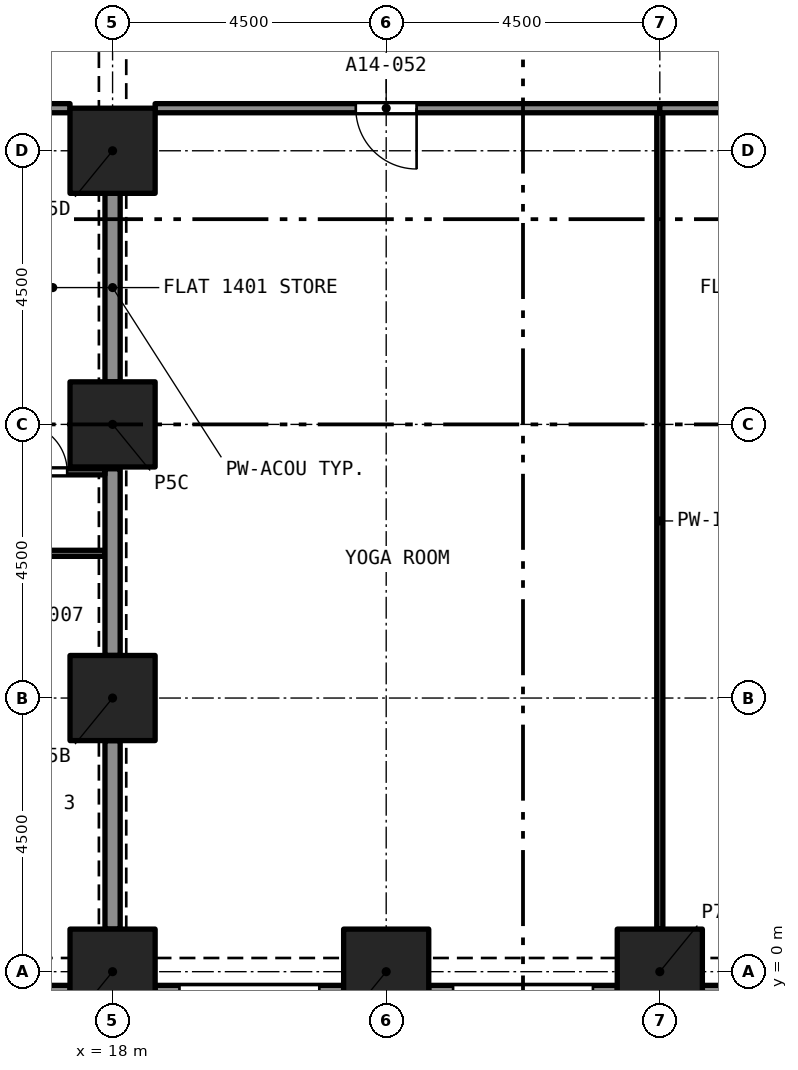
"""IFC4 building model, lengths in metres.
Left out: names, types, materials, properties, quantities, classifications, styles, units other than length and angle.
Written with IfcOpenShell. Run it as: python <this file> out.ifc"""

import sys

from ifc_helpers import new_model, si_unit, direction, frame, frame_2d, origin, origin_2d, place, context, subcontext, project, spatial, rectangle, extrude, element, fill, save


model = new_model("IFC4")
c1 = context("Model", 3, precision=1e-05, world=origin(), true_north=direction((0.0, 1.0)))
c2 = subcontext(c1, "Body", "Model", "MODEL_VIEW")
j1 = project(units=[si_unit("LENGTHUNIT", "METRE"), si_unit("PLANEANGLEUNIT", "RADIAN")], contexts=[c1])
p1 = place(None, origin())
s1 = spatial("IfcSite", under=j1, at=p1, CompositionType="ELEMENT")
p2 = place(p1, origin())
s2 = spatial("IfcBuilding", under=s1, at=p2, CompositionType="ELEMENT")
p3 = place(p2, frame((0.0, 0.0, 56.0)))
s3 = spatial("IfcBuildingStorey", under=s2, at=p3, CompositionType="ELEMENT", Elevation=56.0)
for number, where, z_axis, x_axis in (
    (1, (18.0, 0.0, 0.0), (0.0, 0.0, 1.0), (1.0, 0.0, 0.0)),
    (2, (22.5, 0.0, 0.0), (0.0, 0.0, 1.0), (1.0, 0.0, 0.0)),
    (3, (27.0, 0.0, 0.0), (0.0, 0.0, 1.0), (1.0, 0.0, 0.0)),
    (4, (18.0, 4.5, 0.0), (0.0, 0.0, 1.0), (1.0, 0.0, 0.0)),
    (5, (18.0, 9.0, 0.0), (0.0, 0.0, 1.0), (1.0, 0.0, 0.0)),
    (6, (18.0, 13.5, 0.0), (0.0, 0.0, 1.0), (1.0, 0.0, 0.0)),
):
    element("IfcColumn", number, at=place(p3, frame(where, z_axis=z_axis, x_axis=x_axis)), inside=s3, PredefinedType="COLUMN", context=c2, shape_type="SweptSolid", body=[
        extrude(rectangle(XDim=1.4, YDim=1.4, at=origin_2d()), origin(), (0.0, 0.0, 1.0), 3.2),
    ])
p4 = place(p3, frame((17.3, -0.375, 0.0), z_axis=(0.0, 0.0, 1.0), x_axis=(-1.0, 0.0, 0.0)))
e7 = element("IfcWall", 7, at=p4, inside=s3, PredefinedType="SOLIDWALL", context=c2, shape_type="SweptSolid", body=[
    extrude(rectangle(XDim=3.1, YDim=0.3, at=frame_2d((1.55, 0.0))), origin(), (0.0, 0.0, 1.0), 3.2),
])
p5 = place(p4, frame((0.4, 0.0, 0.45)))
e8 = element("IfcOpeningElement", 8, at=p5, cuts=e7, PredefinedType="OPENING", context=c2, shape_type="SweptSolid", body=[
    extrude(rectangle(XDim=2.3, YDim=1.95, at=frame_2d((1.15, 0.975))), frame((0.0, 0.16, 0.0), z_axis=(0.0, -1.0, 0.0), x_axis=(1.0, 0.0, 0.0)), (0.0, 0.0, 1.0), 0.32),
])
p6 = place(p3, frame((21.8, -0.375, 0.0), z_axis=(0.0, 0.0, 1.0), x_axis=(-1.0, 0.0, 0.0)))
e9 = element("IfcWall", 9, at=p6, inside=s3, PredefinedType="SOLIDWALL", context=c2, shape_type="SweptSolid", body=[
    extrude(rectangle(XDim=3.1, YDim=0.3, at=frame_2d((1.55, 0.0))), origin(), (0.0, 0.0, 1.0), 3.2),
])
p7 = place(p6, frame((0.4, 0.0, 0.45)))
e10 = element("IfcOpeningElement", 10, at=p7, cuts=e9, PredefinedType="OPENING", context=c2, shape_type="SweptSolid", body=[
    extrude(rectangle(XDim=2.3, YDim=1.95, at=frame_2d((1.15, 0.975))), frame((0.0, 0.16, 0.0), z_axis=(0.0, -1.0, 0.0), x_axis=(1.0, 0.0, 0.0)), (0.0, 0.0, 1.0), 0.32),
])
p8 = place(p3, frame((26.3, -0.375, 0.0), z_axis=(0.0, 0.0, 1.0), x_axis=(-1.0, 0.0, 0.0)))
e11 = element("IfcWall", 11, at=p8, inside=s3, PredefinedType="SOLIDWALL", context=c2, shape_type="SweptSolid", body=[
    extrude(rectangle(XDim=3.1, YDim=0.3, at=frame_2d((1.55, 0.0))), origin(), (0.0, 0.0, 1.0), 3.2),
])
p9 = place(p8, frame((0.4, 0.0, 0.45)))
e12 = element("IfcOpeningElement", 12, at=p9, cuts=e11, PredefinedType="OPENING", context=c2, shape_type="SweptSolid", body=[
    extrude(rectangle(XDim=2.3, YDim=1.95, at=frame_2d((1.15, 0.975))), frame((0.0, 0.16, 0.0), z_axis=(0.0, -1.0, 0.0), x_axis=(1.0, 0.0, 0.0)), (0.0, 0.0, 1.0), 0.32),
])
p10 = place(p3, frame((30.8, -0.375, 0.0), z_axis=(0.0, 0.0, 1.0), x_axis=(-1.0, 0.0, 0.0)))
e13 = element("IfcWall", 13, at=p10, inside=s3, PredefinedType="SOLIDWALL", context=c2, shape_type="SweptSolid", body=[
    extrude(rectangle(XDim=3.1, YDim=0.3, at=frame_2d((1.55, 0.0))), origin(), (0.0, 0.0, 1.0), 3.2),
])
p11 = place(p10, frame((0.4, 0.0, 0.45)))
e14 = element("IfcOpeningElement", 14, at=p11, cuts=e13, PredefinedType="OPENING", context=c2, shape_type="SweptSolid", body=[
    extrude(rectangle(XDim=2.3, YDim=1.95, at=frame_2d((1.15, 0.975))), frame((0.0, 0.16, 0.0), z_axis=(0.0, -1.0, 0.0), x_axis=(1.0, 0.0, 0.0)), (0.0, 0.0, 1.0), 0.32),
])
p12 = place(p3, frame((17.875, 6.88, 0.0), z_axis=(0.0, 0.0, 1.0), x_axis=(-1.0, 0.0, 0.0)))
e15 = element("IfcWall", 15, at=p12, inside=s3, PredefinedType="PARTITIONING", context=c2, shape_type="SweptSolid", body=[
    extrude(rectangle(XDim=4.375, YDim=0.1, at=frame_2d((2.188, 0.0))), origin(), (0.0, 0.0, 1.0), 2.9),
])
p13 = place(p12, frame((1.675, 0.0, 0.0)))
e16 = element("IfcOpeningElement", 16, at=p13, cuts=e15, PredefinedType="OPENING", context=c2, shape_type="SweptSolid", body=[
    extrude(rectangle(XDim=0.9, YDim=2.1, at=frame_2d((0.45, 1.05))), frame((0.0, 0.06, 0.0), z_axis=(0.0, -1.0, 0.0), x_axis=(1.0, 0.0, 0.0)), (0.0, 0.0, 1.0), 0.12),
])
p14 = place(p3, frame((18.0, 5.2, 0.0), z_axis=(0.0, 0.0, 1.0), x_axis=(0.0, 1.0, 0.0)))
e17 = element("IfcWall", 17, at=p14, inside=s3, PredefinedType="PARTITIONING", context=c2, shape_type="SweptSolid", body=[
    extrude(rectangle(XDim=3.07, YDim=0.25, at=frame_2d((1.535, 0.0))), origin(), (0.0, 0.0, 1.0), 2.38),
])
p15 = place(p3, frame((18.0, 0.7, 0.0), z_axis=(0.0, 0.0, 1.0), x_axis=(0.0, 1.0, 0.0)))
e18 = element("IfcWall", 18, at=p15, inside=s3, PredefinedType="PARTITIONING", context=c2, shape_type="SweptSolid", body=[
    extrude(rectangle(XDim=3.1, YDim=0.25, at=frame_2d((1.55, 0.0))), origin(), (0.0, 0.0, 1.0), 2.38),
])
p16 = place(p3, frame((16.107, 8.22, 0.0), z_axis=(0.0, 0.0, 1.0), x_axis=(1.0, 0.0, 0.0)))
e19 = element("IfcWall", 19, at=p16, inside=s3, PredefinedType="PARTITIONING", context=c2, shape_type="SweptSolid", body=[
    extrude(rectangle(XDim=1.768, YDim=0.1, at=frame_2d((0.884, 0.0))), origin(), (0.0, 0.0, 1.0), 2.9),
])
p17 = place(p16, frame((0.346, 0.0, 0.0)))
e20 = element("IfcOpeningElement", 20, at=p17, cuts=e19, PredefinedType="OPENING", context=c2, shape_type="SweptSolid", body=[
    extrude(rectangle(XDim=0.8, YDim=2.1, at=frame_2d((0.4, 1.05))), frame((0.0, 0.06, 0.0), z_axis=(0.0, -1.0, 0.0), x_axis=(1.0, 0.0, 0.0)), (0.0, 0.0, 1.0), 0.12),
])
p18 = place(p3, frame((11.85, 14.2, 0.0), z_axis=(0.0, 0.0, 1.0), x_axis=(1.0, 0.0, 0.0)))
e21 = element("IfcWall", 21, at=p18, inside=s3, PredefinedType="PARTITIONING", context=c2, shape_type="SweptSolid", body=[
    extrude(rectangle(XDim=5.45, YDim=0.15, at=frame_2d((2.725, 0.0))), origin(), (0.0, 0.0, 1.0), 2.9),
])
p19 = place(p3, frame((18.0, 9.7, 0.0), z_axis=(0.0, 0.0, 1.0), x_axis=(0.0, 1.0, 0.0)))
e22 = element("IfcWall", 22, at=p19, inside=s3, PredefinedType="PARTITIONING", context=c2, shape_type="SweptSolid", body=[
    extrude(rectangle(XDim=3.1, YDim=0.25, at=frame_2d((1.55, 0.0))), origin(), (0.0, 0.0, 1.0), 2.38),
])
p20 = place(p3, frame((27.0, 0.7, 0.0), z_axis=(0.0, 0.0, 1.0), x_axis=(0.0, 1.0, 0.0)))
e23 = element("IfcWall", 23, at=p20, inside=s3, PredefinedType="PARTITIONING", context=c2, shape_type="SweptSolid", body=[
    extrude(rectangle(XDim=13.425, YDim=0.1, at=frame_2d((6.712, 0.0))), origin(), (0.0, 0.0, 1.0), 2.75),
])
p21 = place(p3, frame((27.0, 14.2, 0.0), z_axis=(0.0, 0.0, 1.0), x_axis=(-1.0, 0.0, 0.0)))
e24 = element("IfcWall", 24, at=p21, inside=s3, PredefinedType="PARTITIONING", context=c2, shape_type="SweptSolid", body=[
    extrude(rectangle(XDim=8.3, YDim=0.15, at=frame_2d((4.15, 0.0))), origin(), (0.0, 0.0, 1.0), 2.75),
])
p22 = place(p21, frame((4.0, 0.0, 0.0)))
e25 = element("IfcOpeningElement", 25, at=p22, cuts=e24, PredefinedType="OPENING", context=c2, shape_type="SweptSolid", body=[
    extrude(rectangle(XDim=1.0, YDim=2.1, at=frame_2d((0.5, 1.05))), frame((0.0, 0.085, 0.0), z_axis=(0.0, -1.0, 0.0), x_axis=(1.0, 0.0, 0.0)), (0.0, 0.0, 1.0), 0.17),
])
p23 = place(p3, frame((30.8, 14.2, 0.0), z_axis=(0.0, 0.0, 1.0), x_axis=(-1.0, 0.0, 0.0)))
e26 = element("IfcWall", 26, at=p23, inside=s3, PredefinedType="PARTITIONING", context=c2, shape_type="SweptSolid", body=[
    extrude(rectangle(XDim=3.8, YDim=0.15, at=frame_2d((1.9, 0.0))), origin(), (0.0, 0.0, 1.0), 2.75),
])
p24 = place(p23, frame((1.05, 0.0, 0.0)))
e27 = element("IfcOpeningElement", 27, at=p24, cuts=e26, PredefinedType="OPENING", context=c2, shape_type="SweptSolid", body=[
    extrude(rectangle(XDim=1.0, YDim=2.1, at=frame_2d((0.5, 1.05))), frame((0.0, 0.085, 0.0), z_axis=(0.0, -1.0, 0.0), x_axis=(1.0, 0.0, 0.0)), (0.0, 0.0, 1.0), 0.17),
])
p25 = place(p17, origin())
e28 = element("IfcDoor", 28, at=p25, inside=s3, OperationType="SINGLE_SWING_LEFT", PredefinedType="DOOR", context=c2, shape_type="SweptSolid", body=[
    extrude(rectangle(XDim=0.8, YDim=2.1, at=frame_2d((0.4, 1.05))), frame((0.0, 0.025, 0.0), z_axis=(0.0, -1.0, 0.0), x_axis=(1.0, 0.0, 0.0)), (0.0, 0.0, 1.0), 0.05),
])
fill(e20, e28)
p26 = place(p22, origin())
e29 = element("IfcDoor", 29, at=p26, inside=s3, OperationType="SINGLE_SWING_RIGHT", PredefinedType="DOOR", context=c2, shape_type="SweptSolid", body=[
    extrude(rectangle(XDim=1.0, YDim=2.1, at=frame_2d((0.5, 1.05))), frame((0.0, 0.025, 0.0), z_axis=(0.0, -1.0, 0.0), x_axis=(1.0, 0.0, 0.0)), (0.0, 0.0, 1.0), 0.05),
])
fill(e25, e29)
save(model, sys.argv[1])
